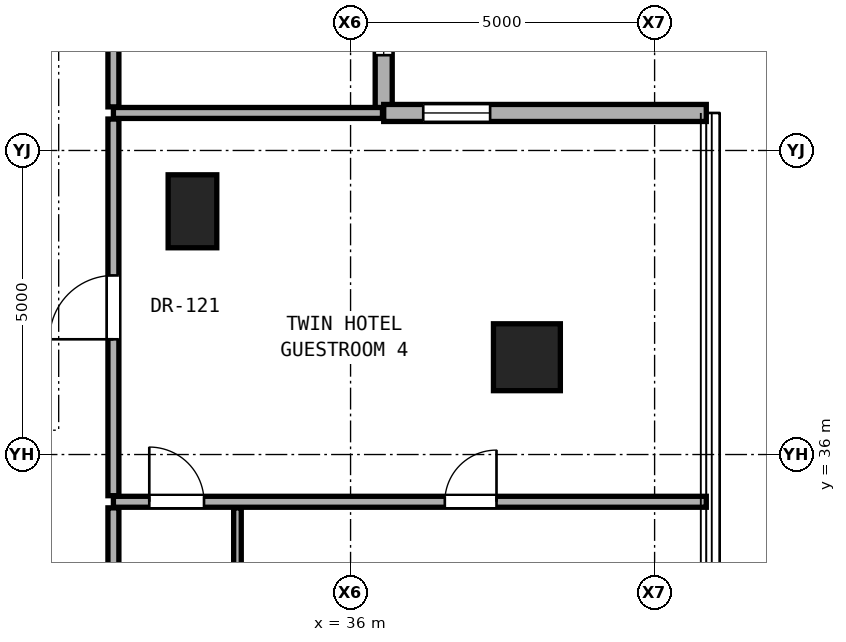
"""IFC4 building model, lengths in metres.
Left out: names, types, materials, properties, quantities, classifications, styles, units other than length and angle.
Written with IfcOpenShell. Run it as: python <this file> out.ifc"""

import sys

from ifc_helpers import new_model, si_unit, direction, frame, frame_2d, origin, origin_2d, place, context, subcontext, project, spatial, rectangle, hollow_rectangle, extrude, element, fill, save


model = new_model("IFC4")
c1 = context("Model", 3, precision=1e-05, world=origin(), true_north=direction((0.0, 1.0)))
c2 = subcontext(c1, "Body", "Model", "MODEL_VIEW")
j1 = project(units=[si_unit("LENGTHUNIT", "METRE"), si_unit("PLANEANGLEUNIT", "RADIAN")], contexts=[c1])
p1 = place(None, origin())
s1 = spatial("IfcSite", under=j1, at=p1, CompositionType="ELEMENT")
p2 = place(p1, origin())
s2 = spatial("IfcBuilding", under=s1, at=p2, CompositionType="ELEMENT")
p3 = place(p2, frame((0.0, 0.0, 101.6)))
s3 = spatial("IfcBuildingStorey", under=s2, at=p3, CompositionType="ELEMENT", Elevation=101.6)
p4 = place(p3, frame((38.9, 37.6, 0.0), z_axis=(0.0, 0.0, 1.0), x_axis=(1.0, 0.0, 0.0)))
e1 = element("IfcColumn", 1, at=p4, inside=s3, PredefinedType="COLUMN", context=c2, shape_type="SweptSolid", body=[
    extrude(hollow_rectangle(XDim=1.1, YDim=1.1, WallThickness=0.06, at=origin_2d()), origin(), (0.0, 0.0, 1.0), 3.3),
])
p5 = place(p3, frame((33.4, 40.0, 0.0), z_axis=(0.0, 0.0, 1.0), x_axis=(1.0, 0.0, 0.0)))
e2 = element("IfcColumn", 2, at=p5, inside=s3, PredefinedType="PILASTER", context=c2, shape_type="SweptSolid", body=[
    extrude(rectangle(XDim=0.8, YDim=1.2, at=origin_2d()), origin(), (0.0, 0.0, 1.0), 3.3),
])
p6 = place(p3, frame((36.545, 41.617, 0.0), z_axis=(0.0, 0.0, 1.0), x_axis=(0.0, 1.0, 0.0)))
e3 = element("IfcWall", 3, at=p6, inside=s3, PredefinedType="SOLIDWALL", context=c2, shape_type="SweptSolid", body=[
    extrude(rectangle(XDim=5.305, YDim=0.28, at=frame_2d((2.653, 0.0))), origin(), (0.0, 0.0, 1.0), 3.06),
])
p7 = place(p6, frame((0.95, 0.0, 0.85)))
e4 = element("IfcOpeningElement", 4, at=p7, cuts=e3, PredefinedType="OPENING", context=c2, shape_type="SweptSolid", body=[
    extrude(rectangle(XDim=1.1, YDim=2.0, at=frame_2d((0.55, 1.0))), frame((0.0, 0.15, 0.0), z_axis=(0.0, -1.0, 0.0), x_axis=(1.0, 0.0, 0.0)), (0.0, 0.0, 1.0), 0.3),
])
p8 = place(p3, frame((41.85, 41.617, 0.0), z_axis=(0.0, 0.0, 1.0), x_axis=(-1.0, 0.0, 0.0)))
e5 = element("IfcWall", 5, at=p8, inside=s3, PredefinedType="SOLIDWALL", context=c2, shape_type="SweptSolid", body=[
    extrude(rectangle(XDim=5.305, YDim=0.28, at=frame_2d((2.653, 0.0))), origin(), (0.0, 0.0, 1.0), 3.06),
])
p9 = place(p8, frame((3.555, 0.0, 0.85)))
e6 = element("IfcOpeningElement", 6, at=p9, cuts=e5, PredefinedType="OPENING", context=c2, shape_type="SweptSolid", body=[
    extrude(rectangle(XDim=1.1, YDim=2.0, at=frame_2d((0.55, 1.0))), frame((0.0, 0.15, 0.0), z_axis=(0.0, -1.0, 0.0), x_axis=(1.0, 0.0, 0.0)), (0.0, 0.0, 1.0), 0.3),
])
p10 = place(p3, frame((32.1, 35.223, 0.0), z_axis=(0.0, 0.0, 1.0), x_axis=(1.0, 0.0, 0.0)))
e7 = element("IfcWall", 7, at=p10, inside=s3, PredefinedType="PARTITIONING", context=c2, shape_type="SweptSolid", body=[
    extrude(rectangle(XDim=9.75, YDim=0.18, at=frame_2d((4.875, 0.0))), origin(), (0.0, 0.0, 1.0), 2.145),
])
p11 = place(p10, frame((5.45, 0.0, 0.0)))
e8 = element("IfcOpeningElement", 8, at=p11, cuts=e7, PredefinedType="OPENING", context=c2, shape_type="SweptSolid", body=[
    extrude(rectangle(XDim=0.85, YDim=2.01, at=frame_2d((0.425, 1.005))), frame((0.0, 0.1, 0.0), z_axis=(0.0, -1.0, 0.0), x_axis=(1.0, 0.0, 0.0)), (0.0, 0.0, 1.0), 0.2),
])
p12 = place(p10, frame((0.59, 0.0, 0.0)))
e9 = element("IfcOpeningElement", 9, at=p12, cuts=e7, PredefinedType="OPENING", context=c2, shape_type="SweptSolid", body=[
    extrude(rectangle(XDim=0.9, YDim=2.1, at=frame_2d((0.45, 1.05))), frame((0.0, 0.1, 0.0), z_axis=(0.0, -1.0, 0.0), x_axis=(1.0, 0.0, 0.0)), (0.0, 0.0, 1.0), 0.2),
])
p13 = place(p3, frame((32.1, 41.617, 0.0), z_axis=(0.0, 0.0, 1.0), x_axis=(1.0, 0.0, 0.0)))
e10 = element("IfcWall", 10, at=p13, inside=s3, PredefinedType="PARTITIONING", context=c2, shape_type="SweptSolid", body=[
    extrude(rectangle(XDim=4.425, YDim=0.18, at=frame_2d((2.212, 0.0))), origin(), (0.0, 0.0, 1.0), 3.08),
])
p14 = place(p3, frame((32.1, 33.023, 0.0), z_axis=(0.0, 0.0, 1.0), x_axis=(0.0, 1.0, 0.0)))
e11 = element("IfcWall", 11, at=p14, inside=s3, PredefinedType="PARTITIONING", context=c2, shape_type="SweptSolid", body=[
    extrude(rectangle(XDim=2.1, YDim=0.18, at=frame_2d((1.05, 0.0))), origin(), (0.0, 0.0, 1.0), 3.08),
])
p15 = place(p3, frame((32.1, 35.323, 0.0), z_axis=(0.0, 0.0, 1.0), x_axis=(0.0, 1.0, 0.0)))
e12 = element("IfcWall", 12, at=p15, inside=s3, PredefinedType="PARTITIONING", context=c2, shape_type="SweptSolid", body=[
    extrude(rectangle(XDim=6.194, YDim=0.18, at=frame_2d((3.097, 0.0))), origin(), (0.0, 0.0, 1.0), 2.456),
])
p16 = place(p15, frame((2.572, 0.0, 0.0)))
e13 = element("IfcOpeningElement", 13, at=p16, cuts=e12, PredefinedType="OPENING", context=c2, shape_type="SweptSolid", body=[
    extrude(rectangle(XDim=1.05, YDim=2.2, at=frame_2d((0.525, 1.1))), frame((0.0, 0.1, 0.0), z_axis=(0.0, -1.0, 0.0), x_axis=(1.0, 0.0, 0.0)), (0.0, 0.0, 1.0), 0.2),
])
p17 = place(p3, frame((32.1, 41.717, 0.0), z_axis=(0.0, 0.0, 1.0), x_axis=(0.0, 1.0, 0.0)))
e14 = element("IfcWall", 14, at=p17, inside=s3, PredefinedType="PARTITIONING", context=c2, shape_type="SweptSolid", body=[
    extrude(rectangle(XDim=5.205, YDim=0.18, at=frame_2d((2.603, 0.0))), origin(), (0.0, 0.0, 1.0), 3.08),
])
p18 = place(p17, frame((2.127, 0.0, 0.0)))
e15 = element("IfcOpeningElement", 15, at=p18, cuts=e14, PredefinedType="OPENING", context=c2, shape_type="SweptSolid", body=[
    extrude(rectangle(XDim=0.95, YDim=2.15, at=frame_2d((0.475, 1.075))), frame((0.0, 0.1, 0.0), z_axis=(0.0, -1.0, 0.0), x_axis=(1.0, 0.0, 0.0)), (0.0, 0.0, 1.0), 0.2),
])
p19 = place(p3, frame((34.14, 33.023, 0.0), z_axis=(0.0, 0.0, 1.0), x_axis=(0.0, 1.0, 0.0)))
e16 = element("IfcWall", 16, at=p19, inside=s3, PredefinedType="PARTITIONING", context=c2, shape_type="SweptSolid", body=[
    extrude(rectangle(XDim=2.1, YDim=0.125, at=frame_2d((1.05, 0.0))), origin(), (0.0, 0.0, 1.0), 3.08),
])
p20 = place(p7, origin())
e17 = element("IfcWindow", 17, at=p20, inside=s3, PartitioningType="SINGLE_PANEL", PredefinedType="WINDOW", context=c2, shape_type="SweptSolid", body=[
    extrude(rectangle(XDim=1.1, YDim=2.0, at=frame_2d((0.55, 1.0))), frame((0.0, 0.03, 0.0), z_axis=(0.0, -1.0, 0.0), x_axis=(1.0, 0.0, 0.0)), (0.0, 0.0, 1.0), 0.06),
])
fill(e4, e17)
p21 = place(p9, origin())
e18 = element("IfcWindow", 18, at=p21, inside=s3, PartitioningType="SINGLE_PANEL", PredefinedType="WINDOW", context=c2, shape_type="SweptSolid", body=[
    extrude(rectangle(XDim=1.1, YDim=2.0, at=frame_2d((0.55, 1.0))), frame((0.0, 0.03, 0.0), z_axis=(0.0, -1.0, 0.0), x_axis=(1.0, 0.0, 0.0)), (0.0, 0.0, 1.0), 0.06),
])
fill(e6, e18)
p22 = place(p16, origin())
e19 = element("IfcDoor", 19, at=p22, inside=s3, OperationType="SINGLE_SWING_LEFT", PredefinedType="DOOR", context=c2, shape_type="SweptSolid", body=[
    extrude(rectangle(XDim=1.05, YDim=2.2, at=frame_2d((0.525, 1.1))), frame((0.0, 0.025, 0.0), z_axis=(0.0, -1.0, 0.0), x_axis=(1.0, 0.0, 0.0)), (0.0, 0.0, 1.0), 0.05),
])
fill(e13, e19)
p23 = place(p11, origin())
e20 = element("IfcDoor", 20, at=p23, inside=s3, OperationType="SINGLE_SWING_RIGHT", PredefinedType="DOOR", context=c2, shape_type="SweptSolid", body=[
    extrude(rectangle(XDim=0.85, YDim=2.01, at=frame_2d((0.425, 1.005))), frame((0.0, 0.025, 0.0), z_axis=(0.0, -1.0, 0.0), x_axis=(1.0, 0.0, 0.0)), (0.0, 0.0, 1.0), 0.05),
])
fill(e8, e20)
p24 = place(p12, origin())
e21 = element("IfcDoor", 21, at=p24, inside=s3, OperationType="SINGLE_SWING_LEFT", PredefinedType="DOOR", context=c2, shape_type="SweptSolid", body=[
    extrude(rectangle(XDim=0.9, YDim=2.1, at=frame_2d((0.45, 1.05))), frame((0.0, 0.025, 0.0), z_axis=(0.0, -1.0, 0.0), x_axis=(1.0, 0.0, 0.0)), (0.0, 0.0, 1.0), 0.05),
])
fill(e9, e21)
save(model, sys.argv[1])
